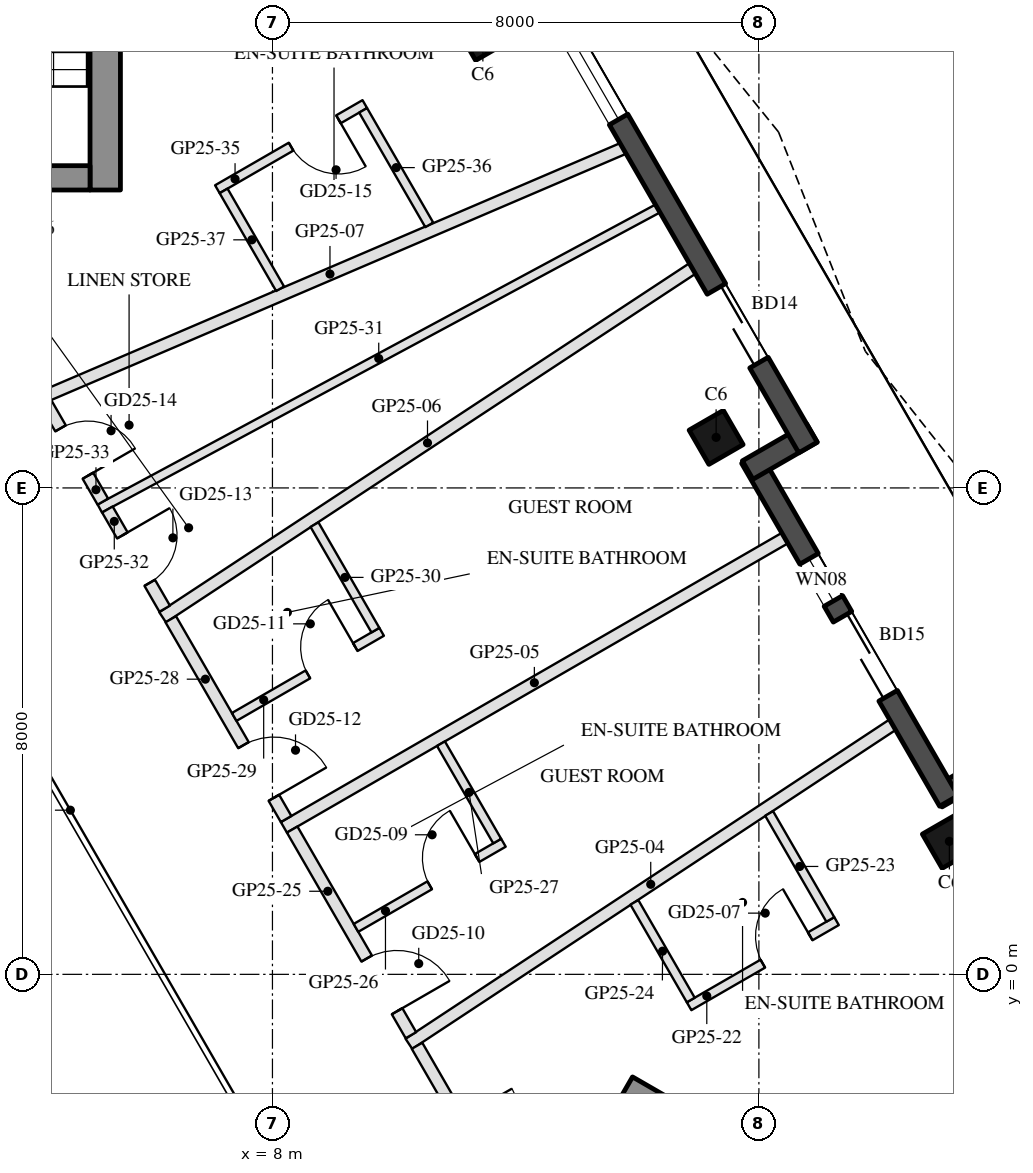
"""IFC4 building model, lengths in metres.
Left out: names, types, materials, properties, quantities, classifications, styles, units other than length and angle.
Written with IfcOpenShell. Run it as: python <this file> out.ifc"""

import sys

from ifc_helpers import new_model, si_unit, direction, frame, frame_2d, origin, origin_2d, place, context, subcontext, project, spatial, rectangle, hollow_rectangle, extrude, boolean, halfspace, element, fill, save


model = new_model("IFC4")
c1 = context("Model", 3, precision=1e-05, world=origin(), true_north=direction((0.0, 1.0)))
c2 = subcontext(c1, "Body", "Model", "MODEL_VIEW")
j1 = project(units=[si_unit("LENGTHUNIT", "METRE"), si_unit("PLANEANGLEUNIT", "RADIAN")], contexts=[c1])
p1 = place(None, origin())
s1 = spatial("IfcSite", under=j1, at=p1, CompositionType="ELEMENT")
p2 = place(p1, origin())
s2 = spatial("IfcBuilding", under=s1, at=p2, CompositionType="ELEMENT")
p3 = place(p2, frame((0.0, 0.0, 261.5)))
s3 = spatial("IfcBuildingStorey", under=s2, at=p3, CompositionType="ELEMENT", Elevation=261.5)
p4 = place(p3, frame((19.132, 2.188, 0.0), z_axis=(0.0, 0.0, 1.0), x_axis=(-0.5, 0.866025403784, 0.0)))
e1 = element("IfcColumn", 1, at=p4, inside=s3, PredefinedType="COLUMN", context=c2, shape_type="SweptSolid", body=[
    boolean("DIFFERENCE", extrude(hollow_rectangle(XDim=0.65, YDim=0.65, WallThickness=0.03, at=origin_2d()), origin(), (0.0, 0.0, 1.0), 3.7), halfspace(frame((0.0, 0.0, 3.66), z_axis=(0.0, 0.0, 1.0), x_axis=(1.0, 0.0, 0.0)), False)),
])
p5 = place(p3, frame((15.296, 8.832, 0.0), z_axis=(0.0, 0.0, 1.0), x_axis=(-0.5, 0.866025403784, 0.0)))
e2 = element("IfcColumn", 2, at=p5, inside=s3, PredefinedType="COLUMN", context=c2, shape_type="SweptSolid", body=[
    boolean("DIFFERENCE", extrude(hollow_rectangle(XDim=0.65, YDim=0.65, WallThickness=0.03, at=origin_2d()), origin(), (0.0, 0.0, 1.0), 3.7), halfspace(frame((0.0, 0.0, 3.663), z_axis=(0.0, 0.0, 1.0), x_axis=(1.0, 0.0, 0.0)), False)),
])
p6 = place(p3, frame((11.461, 15.475, 0.0), z_axis=(0.0, 0.0, 1.0), x_axis=(-0.5, 0.866025403784, 0.0)))
e3 = element("IfcColumn", 3, at=p6, inside=s3, PredefinedType="COLUMN", context=c2, shape_type="SweptSolid", body=[
    boolean("DIFFERENCE", extrude(hollow_rectangle(XDim=0.65, YDim=0.65, WallThickness=0.03, at=origin_2d()), origin(), (0.0, 0.0, 1.0), 3.7), halfspace(frame((0.0, 0.0, 3.66), z_axis=(0.0, 0.0, 1.0), x_axis=(1.0, 0.0, 0.0)), False)),
])
p7 = place(p3, frame((19.982, 3.515, 0.0), z_axis=(0.0, 0.0, 1.0), x_axis=(-0.866092288191, -0.499884134912, 0.0)))
e4 = element("IfcWall", 4, at=p7, inside=s3, PredefinedType="SOLIDWALL", context=c2, shape_type="SweptSolid", body=[
    extrude(rectangle(XDim=1.22, YDim=0.35, at=frame_2d((0.61, 0.0))), origin(), (0.0, 0.0, 1.0), 3.55),
])
p8 = place(p3, frame((19.124, 2.852, 0.0), z_axis=(0.0, 0.0, 1.0), x_axis=(-0.499993986225, 0.866028875811, 0.0)))
e5 = element("IfcWall", 5, at=p8, inside=s3, PredefinedType="SOLIDWALL", context=c2, shape_type="SweptSolid", body=[
    extrude(rectangle(XDim=6.512, YDim=0.35, at=frame_2d((3.256, 0.0))), origin(), (0.0, 0.0, 1.0), 3.55),
])
p9 = place(p8, frame((1.997, 0.0, 0.0)))
e6 = element("IfcOpeningElement", 6, at=p9, cuts=e5, PredefinedType="OPENING", context=c2, shape_type="SweptSolid", body=[
    extrude(rectangle(XDim=1.5, YDim=2.4, at=frame_2d((0.75, 1.2))), frame((0.0, 0.185, 0.0), z_axis=(0.0, -1.0, 0.0), x_axis=(1.0, 0.0, 0.0)), (0.0, 0.0, 1.0), 0.37),
])
p10 = place(p8, frame((3.797, 0.0, 0.3)))
e7 = element("IfcOpeningElement", 7, at=p10, cuts=e5, PredefinedType="OPENING", context=c2, shape_type="SweptSolid", body=[
    extrude(rectangle(XDim=0.8, YDim=2.65, at=frame_2d((0.4, 1.325))), frame((0.0, 0.185, 0.0), z_axis=(0.0, -1.0, 0.0), x_axis=(1.0, 0.0, 0.0)), (0.0, 0.0, 1.0), 0.37),
])
p11 = place(p3, frame((15.815, 8.294, 0.0), z_axis=(0.0, 0.0, 1.0), x_axis=(0.866055662726, 0.499947586314, 0.0)))
e8 = element("IfcWall", 8, at=p11, inside=s3, PredefinedType="SOLIDWALL", context=c2, shape_type="SweptSolid", body=[
    extrude(rectangle(XDim=1.22, YDim=0.35, at=frame_2d((0.61, 0.0))), origin(), (0.0, 0.0, 1.0), 3.55),
])
p12 = place(p3, frame((16.807, 8.665, 0.0), z_axis=(0.0, 0.0, 1.0), x_axis=(-0.499992427901, 0.866029775494, 0.0)))
e9 = element("IfcWall", 9, at=p12, inside=s3, PredefinedType="SOLIDWALL", context=c2, shape_type="SweptSolid", body=[
    extrude(rectangle(XDim=9.472, YDim=0.35, at=frame_2d((4.736, 0.0))), origin(), (0.0, 0.0, 1.0), 3.55),
])
p13 = place(p12, frame((1.612, 0.0, 0.0)))
e10 = element("IfcOpeningElement", 10, at=p13, cuts=e9, PredefinedType="OPENING", context=c2, shape_type="SweptSolid", body=[
    extrude(rectangle(XDim=1.4, YDim=2.4, at=frame_2d((0.7, 1.2))), frame((0.0, 0.185, 0.0), z_axis=(0.0, -1.0, 0.0), x_axis=(1.0, 0.0, 0.0)), (0.0, 0.0, 1.0), 0.37),
])
p14 = place(p12, frame((6.23, 0.0, 0.3)))
e11 = element("IfcOpeningElement", 11, at=p14, cuts=e9, PredefinedType="OPENING", context=c2, shape_type="SweptSolid", body=[
    extrude(rectangle(XDim=1.6, YDim=2.65, at=frame_2d((0.8, 1.325))), frame((0.0, 0.185, 0.0), z_axis=(0.0, -1.0, 0.0), x_axis=(1.0, 0.0, 0.0)), (0.0, 0.0, 1.0), 0.37),
])
p15 = place(p3, frame((5.25, 12.9, 0.0), z_axis=(0.0, 0.0, 1.0), x_axis=(0.0, 1.0, 0.0)))
e12 = element("IfcWall", 12, at=p15, inside=s3, PredefinedType="SHEAR", context=c2, shape_type="SweptSolid", body=[
    extrude(rectangle(XDim=13.934, YDim=0.5, at=frame_2d((6.967, 0.0))), origin(), (0.0, 0.0, 1.0), 3.5),
])
p16 = place(p3, frame((5.0, 13.1, 0.0), z_axis=(0.0, 0.0, 1.0), x_axis=(-1.0, 0.0, 0.0)))
e13 = element("IfcWall", 13, at=p16, inside=s3, PredefinedType="SHEAR", context=c2, shape_type="SweptSolid", body=[
    extrude(rectangle(XDim=10.0, YDim=0.4, at=frame_2d((5.0, 0.0))), origin(), (0.0, 0.0, 1.0), 3.5),
])
p17 = place(p16, frame((3.55, 0.0, 0.0)))
e14 = element("IfcOpeningElement", 14, at=p17, cuts=e13, PredefinedType="OPENING", context=c2, shape_type="SweptSolid", body=[
    extrude(rectangle(XDim=1.1, YDim=2.1, at=frame_2d((0.55, 1.05))), frame((0.0, 0.21, 0.0), z_axis=(0.0, -1.0, 0.0), x_axis=(1.0, 0.0, 0.0)), (0.0, 0.0, 1.0), 0.42),
])
p18 = place(p16, frame((5.85, 0.0, 0.0)))
e15 = element("IfcOpeningElement", 15, at=p18, cuts=e13, PredefinedType="OPENING", context=c2, shape_type="SweptSolid", body=[
    extrude(rectangle(XDim=1.4, YDim=2.1, at=frame_2d((0.7, 1.05))), frame((0.0, 0.21, 0.0), z_axis=(0.0, -1.0, 0.0), x_axis=(1.0, 0.0, 0.0)), (0.0, 0.0, 1.0), 0.42),
])
p19 = place(p3, frame((13.797, -1.903, 0.0), z_axis=(0.0, 0.0, 1.0), x_axis=(0.86602744543, -0.49999646375, 0.0)))
e16 = element("IfcWall", 16, at=p19, inside=s3, PredefinedType="SHEAR", context=c2, shape_type="SweptSolid", body=[
    extrude(rectangle(XDim=13.934, YDim=0.5, at=frame_2d((6.967, 0.0))), origin(), (0.0, 0.0, 1.0), 3.5),
])
p20 = place(p3, frame((18.198, 4.105, 0.0), z_axis=(0.0, 0.0, 1.0), x_axis=(-0.83467370746, -0.550744770356, 0.0)))
e17 = element("IfcWall", 17, at=p20, inside=s3, PredefinedType="PARTITIONING", context=c2, shape_type="SweptSolid", body=[
    extrude(rectangle(XDim=9.53, YDim=0.2, at=frame_2d((4.765, 0.0))), origin(), (0.0, 0.0, 1.0), 3.1),
])
p21 = place(p3, frame((16.427, 7.174, 0.0), z_axis=(0.0, 0.0, 1.0), x_axis=(-0.866033014143, -0.499986818241, 0.0)))
e18 = element("IfcWall", 18, at=p21, inside=s3, PredefinedType="PARTITIONING", context=c2, shape_type="SweptSolid", body=[
    extrude(rectangle(XDim=9.513, YDim=0.2, at=frame_2d((4.756, 0.0))), origin(), (0.0, 0.0, 1.0), 3.1),
])
p22 = place(p3, frame((14.906, 11.608, 0.0), z_axis=(0.0, 0.0, 1.0), x_axis=(-0.835212554653, -0.549927257507, 0.0)))
e19 = element("IfcWall", 19, at=p22, inside=s3, PredefinedType="PARTITIONING", context=c2, shape_type="SweptSolid", body=[
    extrude(rectangle(XDim=10.431, YDim=0.2, at=frame_2d((5.216, 0.0))), origin(), (0.0, 0.0, 1.0), 3.1),
])
p23 = place(p3, frame((13.766, 13.583, 0.0), z_axis=(0.0, 0.0, 1.0), x_axis=(-0.919210042537, -0.393767568115, 0.0)))
e20 = element("IfcWall", 20, at=p23, inside=s3, PredefinedType="PARTITIONING", context=c2, shape_type="SweptSolid", body=[
    extrude(rectangle(XDim=10.487, YDim=0.2, at=frame_2d((5.243, 0.0))), origin(), (0.0, 0.0, 1.0), 3.1),
])
p24 = place(p3, frame((10.378, -1.175, 0.0), z_axis=(0.0, 0.0, 1.0), x_axis=(0.50004096614, -0.86600175068, 0.0)))
e21 = element("IfcWall", 21, at=p24, inside=s3, PredefinedType="PARTITIONING", context=c2, shape_type="SweptSolid", body=[
    extrude(rectangle(XDim=3.782, YDim=0.2, at=frame_2d((1.891, 0.0))), origin(), (0.0, 0.0, 1.0), 3.0),
])
p25 = place(p24, frame((1.391, 0.0, 0.0)))
e22 = element("IfcOpeningElement", 22, at=p25, cuts=e21, PredefinedType="OPENING", context=c2, shape_type="SweptSolid", body=[
    extrude(rectangle(XDim=1.0, YDim=2.1, at=frame_2d((0.5, 1.05))), frame((0.0, 0.11, 0.0), z_axis=(0.0, -1.0, 0.0), x_axis=(1.0, 0.0, 0.0)), (0.0, 0.0, 1.0), 0.22),
])
p26 = place(p3, frame((14.852, -0.524, 0.0), z_axis=(0.0, 0.0, 1.0), x_axis=(0.866034573852, 0.49998411664, 0.0)))
e23 = element("IfcWall", 23, at=p26, inside=s3, PredefinedType="PARTITIONING", context=c2, shape_type="SweptSolid", body=[
    extrude(rectangle(XDim=2.8, YDim=0.15, at=frame_2d((1.4, 0.0))), origin(), (0.0, 0.0, 1.0), 3.55),
])
p27 = place(p26, frame((1.4, 0.0, 0.0)))
e24 = element("IfcOpeningElement", 24, at=p27, cuts=e23, PredefinedType="OPENING", context=c2, shape_type="SweptSolid", body=[
    extrude(rectangle(XDim=0.9, YDim=2.1, at=frame_2d((0.45, 1.05))), frame((0.0, 0.085, 0.0), z_axis=(0.0, -1.0, 0.0), x_axis=(1.0, 0.0, 0.0)), (0.0, 0.0, 1.0), 0.17),
])
p28 = place(p3, frame((17.175, 0.903, 0.0), z_axis=(0.0, 0.0, 1.0), x_axis=(-0.499974444137, 0.866040157966, 0.0)))
e25 = element("IfcWall", 25, at=p28, inside=s3, PredefinedType="PARTITIONING", context=c2, shape_type="SweptSolid", body=[
    extrude(rectangle(XDim=2.013, YDim=0.15, at=frame_2d((1.006, 0.0))), origin(), (0.0, 0.0, 1.0), 3.0),
])
p29 = place(p3, frame((14.879, -0.422, 0.0), z_axis=(0.0, 0.0, 1.0), x_axis=(-0.499920006315, 0.866071583234, 0.0)))
e26 = element("IfcWall", 26, at=p29, inside=s3, PredefinedType="PARTITIONING", context=c2, shape_type="SweptSolid", body=[
    extrude(rectangle(XDim=1.854, YDim=0.15, at=frame_2d((0.927, 0.0))), origin(), (0.0, 0.0, 1.0), 3.0),
])
p30 = place(p3, frame((8.325, 2.381, 0.0), z_axis=(0.0, 0.0, 1.0), x_axis=(0.499991187483, -0.866030491634, 0.0)))
e27 = element("IfcWall", 27, at=p30, inside=s3, PredefinedType="PARTITIONING", context=c2, shape_type="SweptSolid", body=[
    extrude(rectangle(XDim=3.906, YDim=0.2, at=frame_2d((1.953, 0.0))), origin(), (0.0, 0.0, 1.0), 3.0),
])
p31 = place(p30, frame((2.45, 0.0, 0.0)))
e28 = element("IfcOpeningElement", 28, at=p31, cuts=e27, PredefinedType="OPENING", context=c2, shape_type="SweptSolid", body=[
    extrude(rectangle(XDim=1.0, YDim=2.1, at=frame_2d((0.5, 1.05))), frame((0.0, 0.11, 0.0), z_axis=(0.0, -1.0, 0.0), x_axis=(1.0, 0.0, 0.0)), (0.0, 0.0, 1.0), 0.22),
])
p32 = place(p3, frame((9.374, 0.764, 0.0), z_axis=(0.0, 0.0, 1.0), x_axis=(0.865996816683, 0.500049511043, 0.0)))
e29 = element("IfcWall", 29, at=p32, inside=s3, PredefinedType="PARTITIONING", context=c2, shape_type="SweptSolid", body=[
    extrude(rectangle(XDim=2.8, YDim=0.15, at=frame_2d((1.4, 0.0))), origin(), (0.0, 0.0, 1.0), 3.55),
])
p33 = place(p32, frame((1.4, 0.0, 0.0)))
e30 = element("IfcOpeningElement", 30, at=p33, cuts=e29, PredefinedType="OPENING", context=c2, shape_type="SweptSolid", body=[
    extrude(rectangle(XDim=0.9, YDim=2.1, at=frame_2d((0.45, 1.05))), frame((0.0, 0.085, 0.0), z_axis=(0.0, -1.0, 0.0), x_axis=(1.0, 0.0, 0.0)), (0.0, 0.0, 1.0), 0.17),
])
p34 = place(p3, frame((11.696, 2.192, 0.0), z_axis=(0.0, 0.0, 1.0), x_axis=(-0.500042316284, 0.866000971088, 0.0)))
e31 = element("IfcWall", 31, at=p34, inside=s3, PredefinedType="PARTITIONING", context=c2, shape_type="SweptSolid", body=[
    extrude(rectangle(XDim=1.85, YDim=0.15, at=frame_2d((0.925, 0.0))), origin(), (0.0, 0.0, 1.0), 3.0),
])
p35 = place(p3, frame((6.328, 5.84, 0.0), z_axis=(0.0, 0.0, 1.0), x_axis=(0.50002883476, -0.866008755388, 0.0)))
e32 = element("IfcWall", 32, at=p35, inside=s3, PredefinedType="PARTITIONING", context=c2, shape_type="SweptSolid", body=[
    extrude(rectangle(XDim=3.794, YDim=0.2, at=frame_2d((1.897, 0.0))), origin(), (0.0, 0.0, 1.0), 3.0),
])
p36 = place(p35, frame((2.391, 0.0, 0.0)))
e33 = element("IfcOpeningElement", 33, at=p36, cuts=e32, PredefinedType="OPENING", context=c2, shape_type="SweptSolid", body=[
    extrude(rectangle(XDim=1.0, YDim=2.1, at=frame_2d((0.5, 1.05))), frame((0.0, 0.11, 0.0), z_axis=(0.0, -1.0, 0.0), x_axis=(1.0, 0.0, 0.0)), (0.0, 0.0, 1.0), 0.22),
])
p37 = place(p3, frame((7.371, 4.233, 0.0), z_axis=(0.0, 0.0, 1.0), x_axis=(0.866034573852, 0.49998411664, 0.0)))
e34 = element("IfcWall", 34, at=p37, inside=s3, PredefinedType="PARTITIONING", context=c2, shape_type="SweptSolid", body=[
    extrude(rectangle(XDim=2.8, YDim=0.15, at=frame_2d((1.4, 0.0))), origin(), (0.0, 0.0, 1.0), 3.0),
])
p38 = place(p37, frame((1.4, 0.0, 0.0)))
e35 = element("IfcOpeningElement", 35, at=p38, cuts=e34, PredefinedType="OPENING", context=c2, shape_type="SweptSolid", body=[
    extrude(rectangle(XDim=0.9, YDim=2.1, at=frame_2d((0.45, 1.05))), frame((0.0, 0.085, 0.0), z_axis=(0.0, -1.0, 0.0), x_axis=(1.0, 0.0, 0.0)), (0.0, 0.0, 1.0), 0.17),
])
p39 = place(p3, frame((9.693, 5.661, 0.0), z_axis=(0.0, 0.0, 1.0), x_axis=(-0.499964999879, 0.866045610171, 0.0)))
e36 = element("IfcWall", 36, at=p39, inside=s3, PredefinedType="PARTITIONING", context=c2, shape_type="SweptSolid", body=[
    extrude(rectangle(XDim=2.004, YDim=0.15, at=frame_2d((1.002, 0.0))), origin(), (0.0, 0.0, 1.0), 3.0),
])
p40 = place(p3, frame((14.336, 12.595, 0.0), z_axis=(0.0, 0.0, 1.0), x_axis=(-0.880794466183, -0.473498794445, 0.0)))
e37 = element("IfcWall", 37, at=p40, inside=s3, PredefinedType="PARTITIONING", context=c2, shape_type="SweptSolid", body=[
    extrude(rectangle(XDim=10.418, YDim=0.15, at=frame_2d((5.209, 0.0))), origin(), (0.0, 0.0, 1.0), 3.0),
])
p41 = place(p3, frame((5.286, 7.645, 0.0), z_axis=(0.0, 0.0, 1.0), x_axis=(0.500014143148, -0.86601723808, 0.0)))
e38 = element("IfcWall", 38, at=p41, inside=s3, PredefinedType="PARTITIONING", context=c2, shape_type="SweptSolid", body=[
    extrude(rectangle(XDim=1.884, YDim=0.2, at=frame_2d((0.942, 0.0))), origin(), (0.0, 0.0, 1.0), 3.0),
])
p42 = place(p41, frame((0.492, 0.0, 0.0)))
e39 = element("IfcOpeningElement", 39, at=p42, cuts=e38, PredefinedType="OPENING", context=c2, shape_type="SweptSolid", body=[
    extrude(rectangle(XDim=0.9, YDim=2.1, at=frame_2d((0.45, 1.05))), frame((0.0, 0.11, 0.0), z_axis=(0.0, -1.0, 0.0), x_axis=(1.0, 0.0, 0.0)), (0.0, 0.0, 1.0), 0.22),
])
p43 = place(p3, frame((4.269, 9.406, 0.0), z_axis=(0.0, 0.0, 1.0), x_axis=(0.499973055223, -0.8660409598, 0.0)))
e40 = element("IfcWall", 40, at=p43, inside=s3, PredefinedType="PARTITIONING", context=c2, shape_type="SweptSolid", body=[
    extrude(rectangle(XDim=1.883, YDim=0.2, at=frame_2d((0.942, 0.0))), origin(), (0.0, 0.0, 1.0), 3.55),
])
p44 = place(p43, frame((0.492, 0.0, 0.0)))
e41 = element("IfcOpeningElement", 41, at=p44, cuts=e40, PredefinedType="OPENING", context=c2, shape_type="SweptSolid", body=[
    extrude(rectangle(XDim=0.9, YDim=2.1, at=frame_2d((0.45, 1.05))), frame((0.0, 0.11, 0.0), z_axis=(0.0, -1.0, 0.0), x_axis=(1.0, 0.0, 0.0)), (0.0, 0.0, 1.0), 0.22),
])
p45 = place(p3, frame((9.519, 14.313, 0.0), z_axis=(0.0, 0.0, 1.0), x_axis=(-0.865996816683, -0.500049511043, 0.0)))
e42 = element("IfcWall", 42, at=p45, inside=s3, PredefinedType="PARTITIONING", context=c2, shape_type="SweptSolid", body=[
    extrude(rectangle(XDim=2.8, YDim=0.15, at=frame_2d((1.4, 0.0))), origin(), (0.0, 0.0, 1.0), 3.0),
])
p46 = place(p45, frame((0.5, 0.0, 0.0)))
e43 = element("IfcOpeningElement", 43, at=p46, cuts=e42, PredefinedType="OPENING", context=c2, shape_type="SweptSolid", body=[
    extrude(rectangle(XDim=0.9, YDim=2.1, at=frame_2d((0.45, 1.05))), frame((0.0, 0.085, 0.0), z_axis=(0.0, -1.0, 0.0), x_axis=(1.0, 0.0, 0.0)), (0.0, 0.0, 1.0), 0.17),
])
p47 = place(p3, frame((10.579, 12.326, 0.0), z_axis=(0.0, 0.0, 1.0), x_axis=(-0.499965319569, 0.866045425615, 0.0)))
e44 = element("IfcWall", 44, at=p47, inside=s3, PredefinedType="PARTITIONING", context=c2, shape_type="SweptSolid", body=[
    extrude(rectangle(XDim=2.176, YDim=0.15, at=frame_2d((1.088, 0.0))), origin(), (0.0, 0.0, 1.0), 3.55),
])
p48 = place(p3, frame((8.126, 11.276, 0.0), z_axis=(0.0, 0.0, 1.0), x_axis=(-0.500093796661, 0.865971243484, 0.0)))
e45 = element("IfcWall", 45, at=p48, inside=s3, PredefinedType="PARTITIONING", context=c2, shape_type="SweptSolid", body=[
    extrude(rectangle(XDim=1.859, YDim=0.15, at=frame_2d((0.93, 0.0))), origin(), (0.0, 0.0, 1.0), 3.55),
])
p49 = place(p9, frame((1.5, 0.0, 0.0), z_axis=(0.0, 0.0, 1.0), x_axis=(-1.0, 0.0, 0.0)))
e46 = element("IfcDoor", 46, at=p49, inside=s3, OperationType="SLIDING_TO_LEFT", PredefinedType="DOOR", context=c2, shape_type="SweptSolid", body=[
    extrude(rectangle(XDim=1.5, YDim=2.4, at=frame_2d((0.75, 1.2))), frame((0.0, 0.025, 0.0), z_axis=(0.0, -1.0, 0.0), x_axis=(1.0, 0.0, 0.0)), (0.0, 0.0, 1.0), 0.05),
])
fill(e6, e46)
p50 = place(p10, origin())
e47 = element("IfcWindow", 47, at=p50, inside=s3, PartitioningType="SINGLE_PANEL", PredefinedType="WINDOW", context=c2, shape_type="SweptSolid", body=[
    extrude(rectangle(XDim=0.8, YDim=2.65, at=frame_2d((0.4, 1.325))), frame((0.0, 0.03, 0.0), z_axis=(0.0, -1.0, 0.0), x_axis=(1.0, 0.0, 0.0)), (0.0, 0.0, 1.0), 0.06),
])
fill(e7, e47)
p51 = place(p13, frame((1.4, 0.0, 0.0), z_axis=(0.0, 0.0, 1.0), x_axis=(-1.0, 0.0, 0.0)))
e48 = element("IfcDoor", 48, at=p51, inside=s3, OperationType="SLIDING_TO_LEFT", PredefinedType="DOOR", context=c2, shape_type="SweptSolid", body=[
    extrude(rectangle(XDim=1.4, YDim=2.4, at=frame_2d((0.7, 1.2))), frame((0.0, 0.025, 0.0), z_axis=(0.0, -1.0, 0.0), x_axis=(1.0, 0.0, 0.0)), (0.0, 0.0, 1.0), 0.05),
])
fill(e10, e48)
p52 = place(p14, origin())
e49 = element("IfcWindow", 49, at=p52, inside=s3, PartitioningType="SINGLE_PANEL", PredefinedType="WINDOW", context=c2, shape_type="SweptSolid", body=[
    extrude(rectangle(XDim=1.6, YDim=2.65, at=frame_2d((0.8, 1.325))), frame((0.0, 0.03, 0.0), z_axis=(0.0, -1.0, 0.0), x_axis=(1.0, 0.0, 0.0)), (0.0, 0.0, 1.0), 0.06),
])
fill(e11, e49)
p53 = place(p27, origin())
e50 = element("IfcDoor", 50, at=p53, inside=s3, OperationType="SINGLE_SWING_RIGHT", PredefinedType="DOOR", context=c2, shape_type="SweptSolid", body=[
    extrude(rectangle(XDim=0.9, YDim=2.1, at=frame_2d((0.45, 1.05))), frame((0.0, 0.025, 0.0), z_axis=(0.0, -1.0, 0.0), x_axis=(1.0, 0.0, 0.0)), (0.0, 0.0, 1.0), 0.05),
])
fill(e24, e50)
p54 = place(p33, origin())
e51 = element("IfcDoor", 51, at=p54, inside=s3, OperationType="SINGLE_SWING_RIGHT", PredefinedType="DOOR", context=c2, shape_type="SweptSolid", body=[
    extrude(rectangle(XDim=0.9, YDim=2.1, at=frame_2d((0.45, 1.05))), frame((0.0, 0.025, 0.0), z_axis=(0.0, -1.0, 0.0), x_axis=(1.0, 0.0, 0.0)), (0.0, 0.0, 1.0), 0.05),
])
fill(e30, e51)
p55 = place(p31, origin())
e52 = element("IfcDoor", 52, at=p55, inside=s3, OperationType="SINGLE_SWING_RIGHT", PredefinedType="DOOR", context=c2, shape_type="SweptSolid", body=[
    extrude(rectangle(XDim=1.0, YDim=2.1, at=frame_2d((0.5, 1.05))), frame((0.0, 0.025, 0.0), z_axis=(0.0, -1.0, 0.0), x_axis=(1.0, 0.0, 0.0)), (0.0, 0.0, 1.0), 0.05),
])
fill(e28, e52)
p56 = place(p38, origin())
e53 = element("IfcDoor", 53, at=p56, inside=s3, OperationType="SINGLE_SWING_RIGHT", PredefinedType="DOOR", context=c2, shape_type="SweptSolid", body=[
    extrude(rectangle(XDim=0.9, YDim=2.1, at=frame_2d((0.45, 1.05))), frame((0.0, 0.025, 0.0), z_axis=(0.0, -1.0, 0.0), x_axis=(1.0, 0.0, 0.0)), (0.0, 0.0, 1.0), 0.05),
])
fill(e35, e53)
p57 = place(p36, origin())
e54 = element("IfcDoor", 54, at=p57, inside=s3, OperationType="SINGLE_SWING_RIGHT", PredefinedType="DOOR", context=c2, shape_type="SweptSolid", body=[
    extrude(rectangle(XDim=1.0, YDim=2.1, at=frame_2d((0.5, 1.05))), frame((0.0, 0.025, 0.0), z_axis=(0.0, -1.0, 0.0), x_axis=(1.0, 0.0, 0.0)), (0.0, 0.0, 1.0), 0.05),
])
fill(e33, e54)
p58 = place(p42, origin())
e55 = element("IfcDoor", 55, at=p58, inside=s3, OperationType="SINGLE_SWING_LEFT", PredefinedType="DOOR", context=c2, shape_type="SweptSolid", body=[
    extrude(rectangle(XDim=0.9, YDim=2.1, at=frame_2d((0.45, 1.05))), frame((0.0, 0.025, 0.0), z_axis=(0.0, -1.0, 0.0), x_axis=(1.0, 0.0, 0.0)), (0.0, 0.0, 1.0), 0.05),
])
fill(e39, e55)
p59 = place(p44, origin())
e56 = element("IfcDoor", 56, at=p59, inside=s3, OperationType="SINGLE_SWING_RIGHT", PredefinedType="DOOR", context=c2, shape_type="SweptSolid", body=[
    extrude(rectangle(XDim=0.9, YDim=2.1, at=frame_2d((0.45, 1.05))), frame((0.0, 0.025, 0.0), z_axis=(0.0, -1.0, 0.0), x_axis=(1.0, 0.0, 0.0)), (0.0, 0.0, 1.0), 0.05),
])
fill(e41, e56)
p60 = place(p46, origin())
e57 = element("IfcDoor", 57, at=p60, inside=s3, OperationType="SINGLE_SWING_LEFT", PredefinedType="DOOR", context=c2, shape_type="SweptSolid", body=[
    extrude(rectangle(XDim=0.9, YDim=2.1, at=frame_2d((0.45, 1.05))), frame((0.0, 0.025, 0.0), z_axis=(0.0, -1.0, 0.0), x_axis=(1.0, 0.0, 0.0)), (0.0, 0.0, 1.0), 0.05),
])
fill(e43, e57)
save(model, sys.argv[1])
